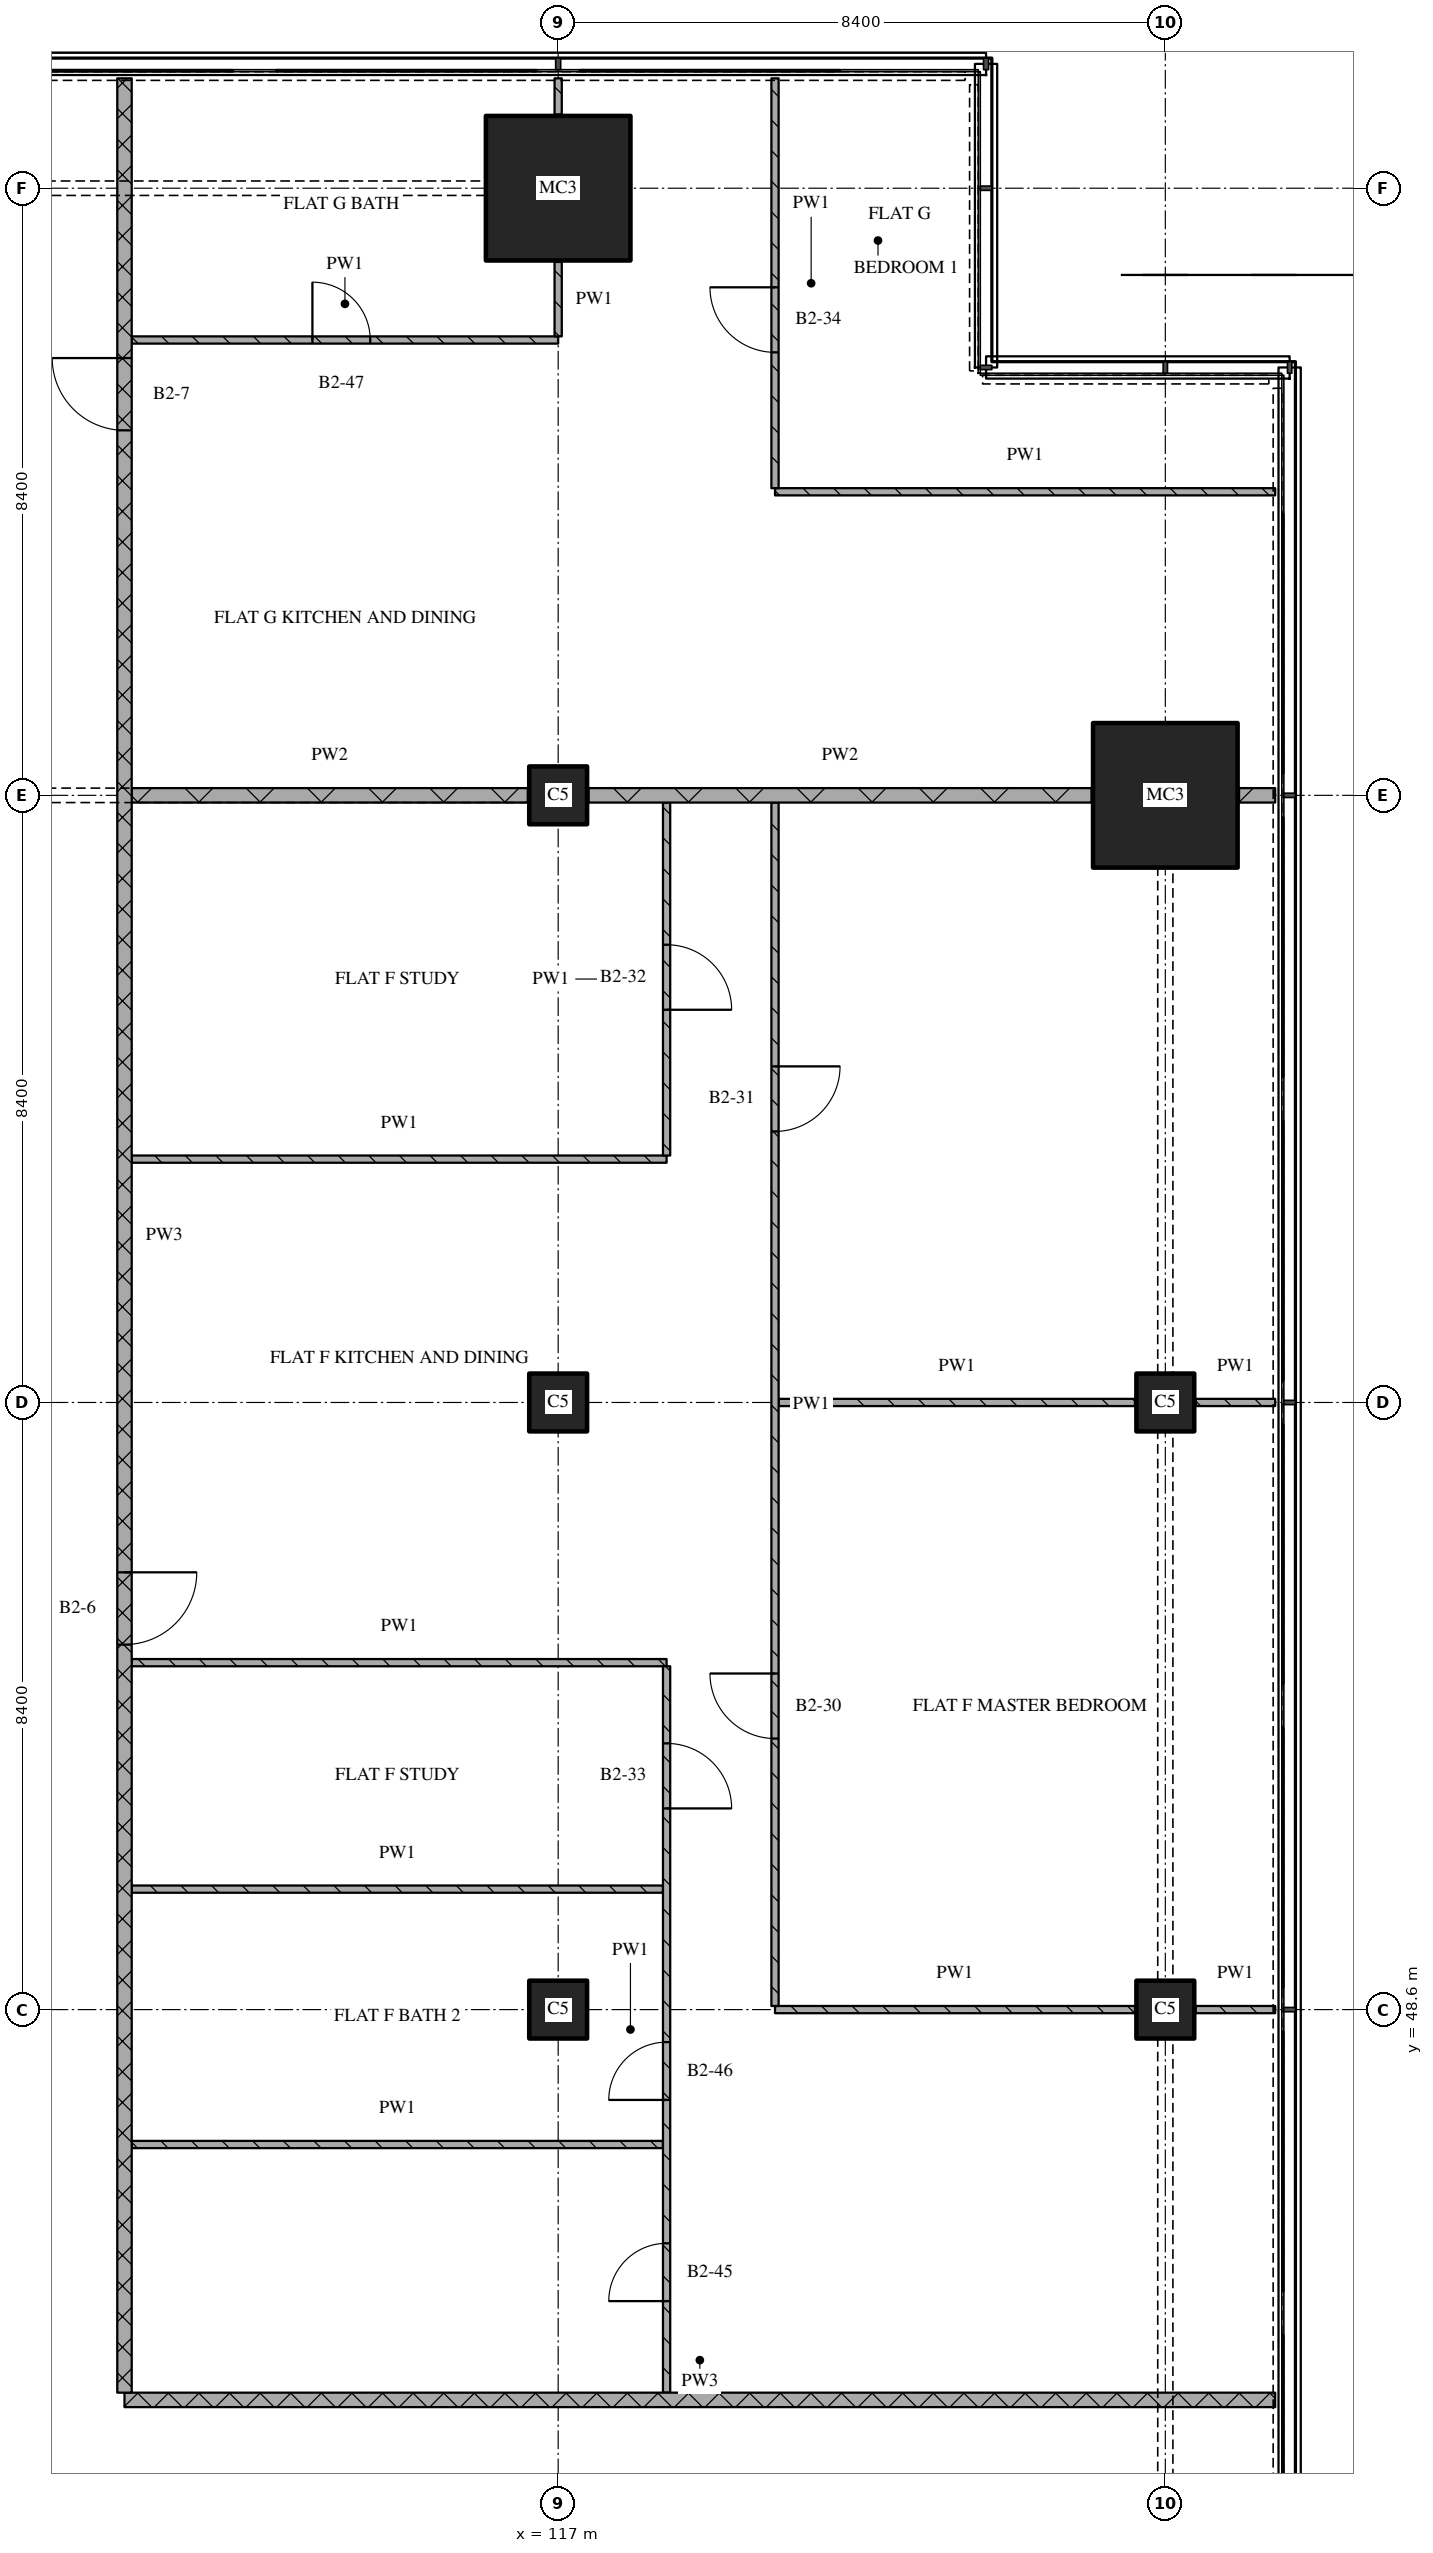
"""IFC4 building model, lengths in metres.
Left out: names, types, materials, properties, quantities, classifications, styles, units other than length and angle.
Written with IfcOpenShell. Run it as: python <this file> out.ifc"""

import sys

from ifc_helpers import new_model, si_unit, direction, frame, frame_2d, origin, origin_2d, place, context, subcontext, project, spatial, rectangle, extrude, element, fill, save


model = new_model("IFC4")
c1 = context("Model", 3, precision=1e-05, world=origin(), true_north=direction((0.0, 1.0)))
c2 = subcontext(c1, "Body", "Model", "MODEL_VIEW")
j1 = project(units=[si_unit("LENGTHUNIT", "METRE"), si_unit("PLANEANGLEUNIT", "RADIAN")], contexts=[c1])
p1 = place(None, origin())
s1 = spatial("IfcSite", under=j1, at=p1, CompositionType="ELEMENT")
p2 = place(p1, origin())
s2 = spatial("IfcBuilding", under=s1, at=p2, CompositionType="ELEMENT")
p3 = place(p2, frame((0.0, 0.0, 113.25)))
s3 = spatial("IfcBuildingStorey", under=s2, at=p3, CompositionType="ELEMENT", Elevation=113.25)
for number, where, z_axis, x_axis in (
    (1, (117.0, 48.6, 0.0), (0.0, 0.0, 1.0), (1.0, 0.0, 0.0)),
    (2, (117.0, 57.0, 0.0), (0.0, 0.0, 1.0), (1.0, 0.0, 0.0)),
    (3, (117.0, 65.4, 0.0), (0.0, 0.0, 1.0), (1.0, 0.0, 0.0)),
):
    element("IfcColumn", number, at=place(p3, frame(where, z_axis=z_axis, x_axis=x_axis)), inside=s3, PredefinedType="COLUMN", context=c2, shape_type="SweptSolid", body=[
        extrude(rectangle(XDim=0.8, YDim=0.8, at=origin_2d()), origin(), (0.0, 0.0, 1.0), 3.6),
    ])
p4 = place(p3, frame((117.0, 73.8, 0.0), z_axis=(0.0, 0.0, 1.0), x_axis=(1.0, 0.0, 0.0)))
e4 = element("IfcColumn", 4, at=p4, inside=s3, PredefinedType="COLUMN", context=c2, shape_type="SweptSolid", body=[
    extrude(rectangle(XDim=2.0, YDim=2.0, at=origin_2d()), origin(), (0.0, 0.0, 1.0), 3.6),
])
for number, where, z_axis, x_axis in (
    (5, (125.4, 48.6, 0.0), (0.0, 0.0, 1.0), (1.0, 0.0, 0.0)),
    (6, (125.4, 57.0, 0.0), (0.0, 0.0, 1.0), (1.0, 0.0, 0.0)),
):
    element("IfcColumn", number, at=place(p3, frame(where, z_axis=z_axis, x_axis=x_axis)), inside=s3, PredefinedType="COLUMN", context=c2, shape_type="SweptSolid", body=[
        extrude(rectangle(XDim=0.8, YDim=0.8, at=origin_2d()), origin(), (0.0, 0.0, 1.0), 3.6),
    ])
p5 = place(p3, frame((125.4, 65.4, 0.0), z_axis=(0.0, 0.0, 1.0), x_axis=(1.0, 0.0, 0.0)))
e7 = element("IfcColumn", 7, at=p5, inside=s3, PredefinedType="COLUMN", context=c2, shape_type="SweptSolid", body=[
    extrude(rectangle(XDim=2.0, YDim=2.0, at=origin_2d()), origin(), (0.0, 0.0, 1.0), 3.6),
])
p6 = place(p3, frame((111.0, 43.2, 0.0), z_axis=(0.0, 0.0, 1.0), x_axis=(1.0, 0.0, 0.0)))
e8 = element("IfcWall", 8, at=p6, inside=s3, PredefinedType="PARTITIONING", context=c2, shape_type="SweptSolid", body=[
    extrude(rectangle(XDim=15.92, YDim=0.2, at=frame_2d((7.96, 0.0))), origin(), (0.0, 0.0, 1.0), 3.32),
])
p7 = place(p3, frame((111.1, 46.733, 0.0), z_axis=(0.0, 0.0, 1.0), x_axis=(1.0, 0.0, 0.0)))
e9 = element("IfcWall", 9, at=p7, inside=s3, PredefinedType="PARTITIONING", context=c2, shape_type="SweptSolid", body=[
    extrude(rectangle(XDim=7.35, YDim=0.1, at=frame_2d((3.675, 0.0))), origin(), (0.0, 0.0, 1.0), 3.32),
])
p8 = place(p3, frame((120.0, 48.6, 0.0), z_axis=(0.0, 0.0, 1.0), x_axis=(1.0, 0.0, 0.0)))
e10 = element("IfcWall", 10, at=p8, inside=s3, PredefinedType="PARTITIONING", context=c2, shape_type="SweptSolid", body=[
    extrude(rectangle(XDim=4.98, YDim=0.1, at=frame_2d((2.49, 0.0))), origin(), (0.0, 0.0, 1.0), 3.32),
])
p9 = place(p3, frame((125.82, 48.6, 0.0), z_axis=(0.0, 0.0, 1.0), x_axis=(1.0, 0.0, 0.0)))
e11 = element("IfcWall", 11, at=p9, inside=s3, PredefinedType="PARTITIONING", context=c2, shape_type="SweptSolid", body=[
    extrude(rectangle(XDim=1.1, YDim=0.1, at=frame_2d((0.55, 0.0))), origin(), (0.0, 0.0, 1.0), 3.32),
])
p10 = place(p3, frame((111.1, 50.267, 0.0), z_axis=(0.0, 0.0, 1.0), x_axis=(1.0, 0.0, 0.0)))
e12 = element("IfcWall", 12, at=p10, inside=s3, PredefinedType="PARTITIONING", context=c2, shape_type="SweptSolid", body=[
    extrude(rectangle(XDim=7.35, YDim=0.1, at=frame_2d((3.675, 0.0))), origin(), (0.0, 0.0, 1.0), 3.32),
])
p11 = place(p3, frame((111.1, 53.4, 0.0), z_axis=(0.0, 0.0, 1.0), x_axis=(1.0, 0.0, 0.0)))
e13 = element("IfcWall", 13, at=p11, inside=s3, PredefinedType="PARTITIONING", context=c2, shape_type="SweptSolid", body=[
    extrude(rectangle(XDim=7.4, YDim=0.1, at=frame_2d((3.7, 0.0))), origin(), (0.0, 0.0, 1.0), 3.32),
])
p12 = place(p3, frame((120.05, 57.0, 0.0), z_axis=(0.0, 0.0, 1.0), x_axis=(1.0, 0.0, 0.0)))
e14 = element("IfcWall", 14, at=p12, inside=s3, PredefinedType="PARTITIONING", context=c2, shape_type="SweptSolid", body=[
    extrude(rectangle(XDim=4.93, YDim=0.1, at=frame_2d((2.465, 0.0))), origin(), (0.0, 0.0, 1.0), 3.32),
])
p13 = place(p3, frame((125.82, 57.0, 0.0), z_axis=(0.0, 0.0, 1.0), x_axis=(1.0, 0.0, 0.0)))
e15 = element("IfcWall", 15, at=p13, inside=s3, PredefinedType="PARTITIONING", context=c2, shape_type="SweptSolid", body=[
    extrude(rectangle(XDim=1.1, YDim=0.1, at=frame_2d((0.55, 0.0))), origin(), (0.0, 0.0, 1.0), 3.32),
])
p14 = place(p3, frame((111.1, 60.367, 0.0), z_axis=(0.0, 0.0, 1.0), x_axis=(1.0, 0.0, 0.0)))
e16 = element("IfcWall", 16, at=p14, inside=s3, PredefinedType="PARTITIONING", context=c2, shape_type="SweptSolid", body=[
    extrude(rectangle(XDim=7.4, YDim=0.1, at=frame_2d((3.7, 0.0))), origin(), (0.0, 0.0, 1.0), 3.32),
])
p15 = place(p3, frame((111.1, 65.4, 0.0), z_axis=(0.0, 0.0, 1.0), x_axis=(1.0, 0.0, 0.0)))
e17 = element("IfcWall", 17, at=p15, inside=s3, PredefinedType="PARTITIONING", context=c2, shape_type="SweptSolid", body=[
    extrude(rectangle(XDim=5.48, YDim=0.2, at=frame_2d((2.74, 0.0))), origin(), (0.0, 0.0, 1.0), 2.82),
])
p16 = place(p3, frame((117.42, 65.4, 0.0), z_axis=(0.0, 0.0, 1.0), x_axis=(1.0, 0.0, 0.0)))
e18 = element("IfcWall", 18, at=p16, inside=s3, PredefinedType="PARTITIONING", context=c2, shape_type="SweptSolid", body=[
    extrude(rectangle(XDim=6.96, YDim=0.2, at=frame_2d((3.48, 0.0))), origin(), (0.0, 0.0, 1.0), 3.32),
])
p17 = place(p3, frame((126.42, 65.4, 0.0), z_axis=(0.0, 0.0, 1.0), x_axis=(1.0, 0.0, 0.0)))
e19 = element("IfcWall", 19, at=p17, inside=s3, PredefinedType="PARTITIONING", context=c2, shape_type="SweptSolid", body=[
    extrude(rectangle(XDim=0.5, YDim=0.2, at=frame_2d((0.25, 0.0))), origin(), (0.0, 0.0, 1.0), 3.32),
])
p18 = place(p3, frame((120.0, 69.6, 0.0), z_axis=(0.0, 0.0, 1.0), x_axis=(1.0, 0.0, 0.0)))
e20 = element("IfcWall", 20, at=p18, inside=s3, PredefinedType="PARTITIONING", context=c2, shape_type="SweptSolid", body=[
    extrude(rectangle(XDim=6.92, YDim=0.1, at=frame_2d((3.46, 0.0))), origin(), (0.0, 0.0, 1.0), 3.32),
])
p19 = place(p3, frame((111.1, 71.7, 0.0), z_axis=(0.0, 0.0, 1.0), x_axis=(1.0, 0.0, 0.0)))
e21 = element("IfcWall", 21, at=p19, inside=s3, PredefinedType="PARTITIONING", context=c2, shape_type="SweptSolid", body=[
    extrude(rectangle(XDim=5.9, YDim=0.1, at=frame_2d((2.95, 0.0))), origin(), (0.0, 0.0, 1.0), 3.32),
])
p20 = place(p19, frame((2.5, 0.0, 0.0)))
e22 = element("IfcOpeningElement", 22, at=p20, cuts=e21, PredefinedType="OPENING", context=c2, shape_type="SweptSolid", body=[
    extrude(rectangle(XDim=0.8, YDim=2.1, at=frame_2d((0.4, 1.05))), frame((0.0, 0.06, 0.0), z_axis=(0.0, -1.0, 0.0), x_axis=(1.0, 0.0, 0.0)), (0.0, 0.0, 1.0), 0.12),
])
p21 = place(p3, frame((111.0, 75.32, 0.0), z_axis=(0.0, 0.0, 1.0), x_axis=(0.0, -1.0, 0.0)))
e23 = element("IfcWall", 23, at=p21, inside=s3, PredefinedType="PARTITIONING", context=c2, shape_type="SweptSolid", body=[
    extrude(rectangle(XDim=32.02, YDim=0.2, at=frame_2d((16.01, 0.0))), origin(), (0.0, 0.0, 1.0), 3.32),
])
p22 = place(p21, frame((3.87, 0.0, 0.0)))
e24 = element("IfcOpeningElement", 24, at=p22, cuts=e23, PredefinedType="OPENING", context=c2, shape_type="SweptSolid", body=[
    extrude(rectangle(XDim=1.0, YDim=2.1, at=frame_2d((0.5, 1.05))), frame((0.0, 0.11, 0.0), z_axis=(0.0, -1.0, 0.0), x_axis=(1.0, 0.0, 0.0)), (0.0, 0.0, 1.0), 0.22),
])
p23 = place(p21, frame((20.67, 0.0, 0.0)))
e25 = element("IfcOpeningElement", 25, at=p23, cuts=e23, PredefinedType="OPENING", context=c2, shape_type="SweptSolid", body=[
    extrude(rectangle(XDim=1.0, YDim=2.1, at=frame_2d((0.5, 1.05))), frame((0.0, 0.11, 0.0), z_axis=(0.0, -1.0, 0.0), x_axis=(1.0, 0.0, 0.0)), (0.0, 0.0, 1.0), 0.22),
])
p24 = place(p3, frame((117.0, 72.78, 0.0), z_axis=(0.0, 0.0, 1.0), x_axis=(0.0, -1.0, 0.0)))
e26 = element("IfcWall", 26, at=p24, inside=s3, PredefinedType="PARTITIONING", context=c2, shape_type="SweptSolid", body=[
    extrude(rectangle(XDim=1.03, YDim=0.1, at=frame_2d((0.515, 0.0))), origin(), (0.0, 0.0, 1.0), 3.32),
])
p25 = place(p3, frame((117.0, 75.32, 0.0), z_axis=(0.0, 0.0, 1.0), x_axis=(0.0, -1.0, 0.0)))
e27 = element("IfcWall", 27, at=p25, inside=s3, PredefinedType="PARTITIONING", context=c2, shape_type="SweptSolid", body=[
    extrude(rectangle(XDim=0.5, YDim=0.1, at=frame_2d((0.25, 0.0))), origin(), (0.0, 0.0, 1.0), 3.32),
])
p26 = place(p3, frame((118.5, 43.3, 0.0), z_axis=(0.0, 0.0, 1.0), x_axis=(0.0, 1.0, 0.0)))
e28 = element("IfcWall", 28, at=p26, inside=s3, PredefinedType="PARTITIONING", context=c2, shape_type="SweptSolid", body=[
    extrude(rectangle(XDim=10.05, YDim=0.1, at=frame_2d((5.025, 0.0))), origin(), (0.0, 0.0, 1.0), 3.32),
])
p27 = place(p26, frame((1.267, 0.0, 0.0)))
e29 = element("IfcOpeningElement", 29, at=p27, cuts=e28, PredefinedType="OPENING", context=c2, shape_type="SweptSolid", body=[
    extrude(rectangle(XDim=0.8, YDim=2.1, at=frame_2d((0.4, 1.05))), frame((0.0, 0.06, 0.0), z_axis=(0.0, -1.0, 0.0), x_axis=(1.0, 0.0, 0.0)), (0.0, 0.0, 1.0), 0.12),
])
p28 = place(p26, frame((4.05, 0.0, 0.0)))
e30 = element("IfcOpeningElement", 30, at=p28, cuts=e28, PredefinedType="OPENING", context=c2, shape_type="SweptSolid", body=[
    extrude(rectangle(XDim=0.8, YDim=2.1, at=frame_2d((0.4, 1.05))), frame((0.0, 0.06, 0.0), z_axis=(0.0, -1.0, 0.0), x_axis=(1.0, 0.0, 0.0)), (0.0, 0.0, 1.0), 0.12),
])
p29 = place(p26, frame((8.083, 0.0, 0.0)))
e31 = element("IfcOpeningElement", 31, at=p29, cuts=e28, PredefinedType="OPENING", context=c2, shape_type="SweptSolid", body=[
    extrude(rectangle(XDim=0.9, YDim=2.1, at=frame_2d((0.45, 1.05))), frame((0.0, 0.06, 0.0), z_axis=(0.0, -1.0, 0.0), x_axis=(1.0, 0.0, 0.0)), (0.0, 0.0, 1.0), 0.12),
])
p30 = place(p3, frame((118.5, 60.417, 0.0), z_axis=(0.0, 0.0, 1.0), x_axis=(0.0, 1.0, 0.0)))
e32 = element("IfcWall", 32, at=p30, inside=s3, PredefinedType="PARTITIONING", context=c2, shape_type="SweptSolid", body=[
    extrude(rectangle(XDim=4.883, YDim=0.1, at=frame_2d((2.442, 0.0))), origin(), (0.0, 0.0, 1.0), 3.32),
])
p31 = place(p30, frame((2.017, 0.0, 0.0)))
e33 = element("IfcOpeningElement", 33, at=p31, cuts=e32, PredefinedType="OPENING", context=c2, shape_type="SweptSolid", body=[
    extrude(rectangle(XDim=0.9, YDim=2.1, at=frame_2d((0.45, 1.05))), frame((0.0, 0.06, 0.0), z_axis=(0.0, -1.0, 0.0), x_axis=(1.0, 0.0, 0.0)), (0.0, 0.0, 1.0), 0.12),
])
p32 = place(p3, frame((120.0, 65.3, 0.0), z_axis=(0.0, 0.0, 1.0), x_axis=(0.0, -1.0, 0.0)))
e34 = element("IfcWall", 34, at=p32, inside=s3, PredefinedType="PARTITIONING", context=c2, shape_type="SweptSolid", body=[
    extrude(rectangle(XDim=16.65, YDim=0.1, at=frame_2d((8.325, 0.0))), origin(), (0.0, 0.0, 1.0), 3.32),
])
p33 = place(p32, frame((3.65, 0.0, 0.0)))
e35 = element("IfcOpeningElement", 35, at=p33, cuts=e34, PredefinedType="OPENING", context=c2, shape_type="SweptSolid", body=[
    extrude(rectangle(XDim=0.9, YDim=2.1, at=frame_2d((0.45, 1.05))), frame((0.0, 0.06, 0.0), z_axis=(0.0, -1.0, 0.0), x_axis=(1.0, 0.0, 0.0)), (0.0, 0.0, 1.0), 0.12),
])
p34 = place(p32, frame((12.05, 0.0, 0.0)))
e36 = element("IfcOpeningElement", 36, at=p34, cuts=e34, PredefinedType="OPENING", context=c2, shape_type="SweptSolid", body=[
    extrude(rectangle(XDim=0.9, YDim=2.1, at=frame_2d((0.45, 1.05))), frame((0.0, 0.06, 0.0), z_axis=(0.0, -1.0, 0.0), x_axis=(1.0, 0.0, 0.0)), (0.0, 0.0, 1.0), 0.12),
])
p35 = place(p3, frame((120.0, 75.32, 0.0), z_axis=(0.0, 0.0, 1.0), x_axis=(0.0, -1.0, 0.0)))
e37 = element("IfcWall", 37, at=p35, inside=s3, PredefinedType="PARTITIONING", context=c2, shape_type="SweptSolid", body=[
    extrude(rectangle(XDim=5.67, YDim=0.1, at=frame_2d((2.835, 0.0))), origin(), (0.0, 0.0, 1.0), 3.32),
])
p36 = place(p35, frame((2.891, 0.0, 0.0)))
e38 = element("IfcOpeningElement", 38, at=p36, cuts=e37, PredefinedType="OPENING", context=c2, shape_type="SweptSolid", body=[
    extrude(rectangle(XDim=0.9, YDim=2.1, at=frame_2d((0.45, 1.05))), frame((0.0, 0.06, 0.0), z_axis=(0.0, -1.0, 0.0), x_axis=(1.0, 0.0, 0.0)), (0.0, 0.0, 1.0), 0.12),
])
p37 = place(p20, origin())
e39 = element("IfcDoor", 39, at=p37, inside=s3, OperationType="SINGLE_SWING_LEFT", PredefinedType="DOOR", context=c2, shape_type="SweptSolid", body=[
    extrude(rectangle(XDim=0.8, YDim=2.1, at=frame_2d((0.4, 1.05))), frame((0.0, 0.025, 0.0), z_axis=(0.0, -1.0, 0.0), x_axis=(1.0, 0.0, 0.0)), (0.0, 0.0, 1.0), 0.05),
])
fill(e22, e39)
p38 = place(p22, origin())
e40 = element("IfcDoor", 40, at=p38, inside=s3, OperationType="SINGLE_SWING_RIGHT", PredefinedType="DOOR", context=c2, shape_type="SweptSolid", body=[
    extrude(rectangle(XDim=1.0, YDim=2.1, at=frame_2d((0.5, 1.05))), frame((0.0, 0.025, 0.0), z_axis=(0.0, -1.0, 0.0), x_axis=(1.0, 0.0, 0.0)), (0.0, 0.0, 1.0), 0.05),
])
fill(e24, e40)
p39 = place(p23, origin())
e41 = element("IfcDoor", 41, at=p39, inside=s3, OperationType="SINGLE_SWING_LEFT", PredefinedType="DOOR", context=c2, shape_type="SweptSolid", body=[
    extrude(rectangle(XDim=1.0, YDim=2.1, at=frame_2d((0.5, 1.05))), frame((0.0, 0.025, 0.0), z_axis=(0.0, -1.0, 0.0), x_axis=(1.0, 0.0, 0.0)), (0.0, 0.0, 1.0), 0.05),
])
fill(e25, e41)
p40 = place(p27, origin())
e42 = element("IfcDoor", 42, at=p40, inside=s3, OperationType="SINGLE_SWING_LEFT", PredefinedType="DOOR", context=c2, shape_type="SweptSolid", body=[
    extrude(rectangle(XDim=0.8, YDim=2.1, at=frame_2d((0.4, 1.05))), frame((0.0, 0.025, 0.0), z_axis=(0.0, -1.0, 0.0), x_axis=(1.0, 0.0, 0.0)), (0.0, 0.0, 1.0), 0.05),
])
fill(e29, e42)
p41 = place(p28, origin())
e43 = element("IfcDoor", 43, at=p41, inside=s3, OperationType="SINGLE_SWING_LEFT", PredefinedType="DOOR", context=c2, shape_type="SweptSolid", body=[
    extrude(rectangle(XDim=0.8, YDim=2.1, at=frame_2d((0.4, 1.05))), frame((0.0, 0.025, 0.0), z_axis=(0.0, -1.0, 0.0), x_axis=(1.0, 0.0, 0.0)), (0.0, 0.0, 1.0), 0.05),
])
fill(e30, e43)
p42 = place(p29, origin())
e44 = element("IfcDoor", 44, at=p42, inside=s3, OperationType="SINGLE_SWING_RIGHT", PredefinedType="DOOR", context=c2, shape_type="SweptSolid", body=[
    extrude(rectangle(XDim=0.9, YDim=2.1, at=frame_2d((0.45, 1.05))), frame((0.0, 0.025, 0.0), z_axis=(0.0, -1.0, 0.0), x_axis=(1.0, 0.0, 0.0)), (0.0, 0.0, 1.0), 0.05),
])
fill(e31, e44)
p43 = place(p31, origin())
e45 = element("IfcDoor", 45, at=p43, inside=s3, OperationType="SINGLE_SWING_RIGHT", PredefinedType="DOOR", context=c2, shape_type="SweptSolid", body=[
    extrude(rectangle(XDim=0.9, YDim=2.1, at=frame_2d((0.45, 1.05))), frame((0.0, 0.025, 0.0), z_axis=(0.0, -1.0, 0.0), x_axis=(1.0, 0.0, 0.0)), (0.0, 0.0, 1.0), 0.05),
])
fill(e33, e45)
p44 = place(p33, origin())
e46 = element("IfcDoor", 46, at=p44, inside=s3, OperationType="SINGLE_SWING_LEFT", PredefinedType="DOOR", context=c2, shape_type="SweptSolid", body=[
    extrude(rectangle(XDim=0.9, YDim=2.1, at=frame_2d((0.45, 1.05))), frame((0.0, 0.025, 0.0), z_axis=(0.0, -1.0, 0.0), x_axis=(1.0, 0.0, 0.0)), (0.0, 0.0, 1.0), 0.05),
])
fill(e35, e46)
p45 = place(p34, origin())
e47 = element("IfcDoor", 47, at=p45, inside=s3, OperationType="SINGLE_SWING_RIGHT", PredefinedType="DOOR", context=c2, shape_type="SweptSolid", body=[
    extrude(rectangle(XDim=0.9, YDim=2.1, at=frame_2d((0.45, 1.05))), frame((0.0, 0.025, 0.0), z_axis=(0.0, -1.0, 0.0), x_axis=(1.0, 0.0, 0.0)), (0.0, 0.0, 1.0), 0.05),
])
fill(e36, e47)
p46 = place(p36, origin())
e48 = element("IfcDoor", 48, at=p46, inside=s3, OperationType="SINGLE_SWING_RIGHT", PredefinedType="DOOR", context=c2, shape_type="SweptSolid", body=[
    extrude(rectangle(XDim=0.9, YDim=2.1, at=frame_2d((0.45, 1.05))), frame((0.0, 0.025, 0.0), z_axis=(0.0, -1.0, 0.0), x_axis=(1.0, 0.0, 0.0)), (0.0, 0.0, 1.0), 0.05),
])
fill(e38, e48)
save(model, sys.argv[1])
